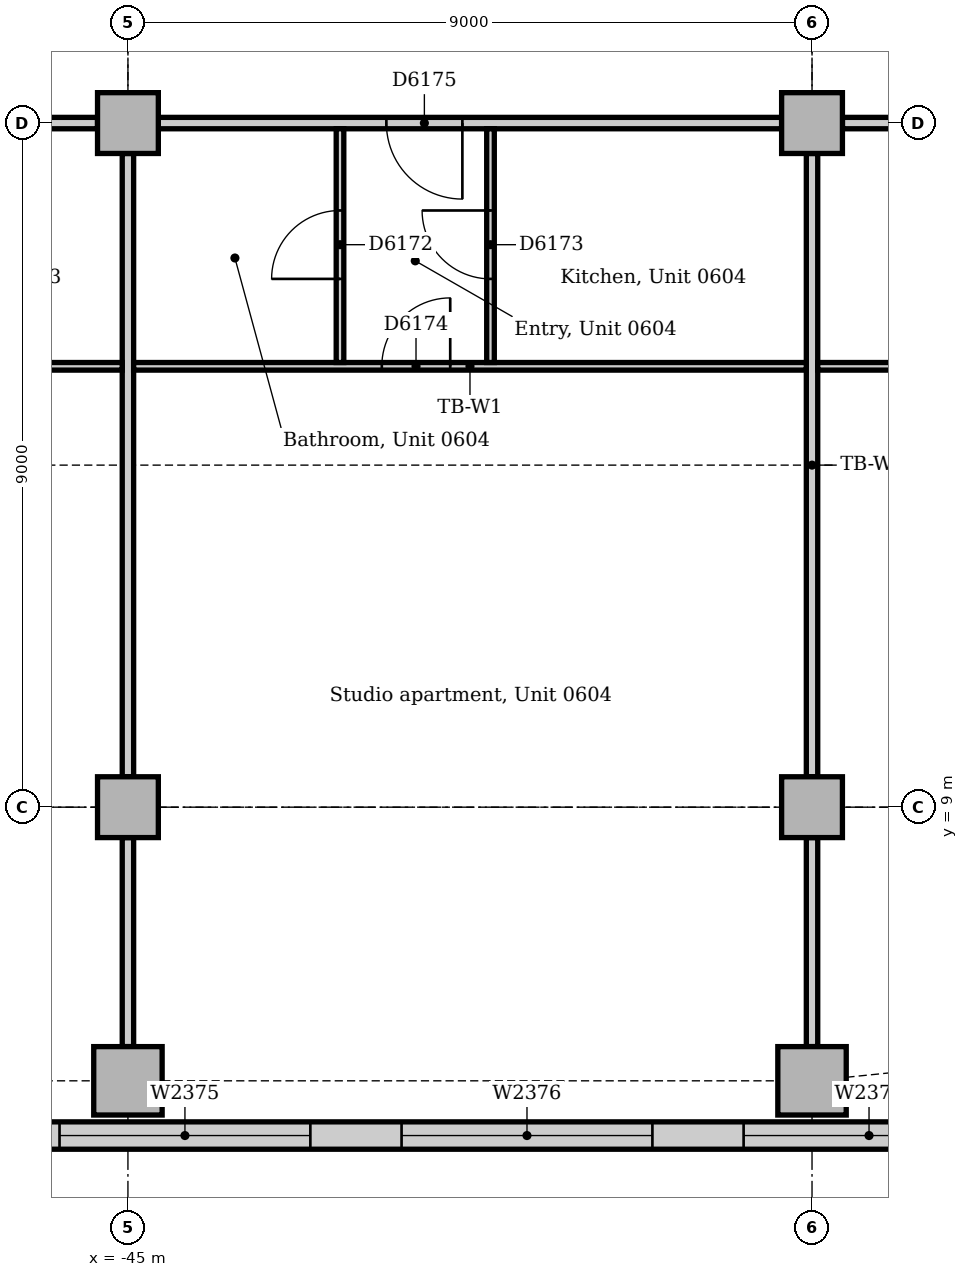
"""IFC4 building model, lengths in metres.
Left out: names, types, materials, properties, quantities, classifications, styles, units other than length and angle.
Written with IfcOpenShell. Run it as: python <this file> out.ifc"""

import sys

from ifc_helpers import new_model, si_unit, direction, frame, frame_2d, origin, origin_2d, place, context, subcontext, project, spatial, rectangle, extrude, element, fill, save


model = new_model("IFC4")
c1 = context("Model", 3, precision=1e-05, world=origin(), true_north=direction((0.0, 1.0)))
c2 = subcontext(c1, "Body", "Model", "MODEL_VIEW")
j1 = project(units=[si_unit("LENGTHUNIT", "METRE"), si_unit("PLANEANGLEUNIT", "RADIAN")], contexts=[c1])
p1 = place(None, origin())
s1 = spatial("IfcSite", under=j1, at=p1, CompositionType="ELEMENT")
p2 = place(p1, origin())
s2 = spatial("IfcBuilding", under=s1, at=p2, CompositionType="ELEMENT")
p3 = place(p2, frame((0.0, 0.0, 30.0)))
s3 = spatial("IfcBuildingStorey", under=s2, at=p3, CompositionType="ELEMENT", Elevation=30.0)
for number, where, z_axis, x_axis in (
    (1, (-45.0, 5.4, 0.0), (0.0, 0.0, 1.0), (1.0, 0.0, 0.0)),
    (2, (-36.0, 5.4, 0.0), (0.0, 0.0, 1.0), (1.0, 0.0, 0.0)),
):
    element("IfcColumn", number, at=place(p3, frame(where, z_axis=z_axis, x_axis=x_axis)), inside=s3, PredefinedType="COLUMN", context=c2, shape_type="SweptSolid", body=[
        extrude(rectangle(XDim=0.9, YDim=0.9, at=origin_2d()), origin(), (0.0, 0.0, 1.0), 3.85),
    ])
for number, where, z_axis, x_axis in (
    (3, (-45.0, 9.0, 0.0), (0.0, 0.0, 1.0), (1.0, 0.0, 0.0)),
    (4, (-45.0, 18.0, 0.0), (0.0, 0.0, 1.0), (1.0, 0.0, 0.0)),
    (5, (-36.0, 9.0, 0.0), (0.0, 0.0, 1.0), (1.0, 0.0, 0.0)),
    (6, (-36.0, 18.0, 0.0), (0.0, 0.0, 1.0), (1.0, 0.0, 0.0)),
):
    element("IfcColumn", number, at=place(p3, frame(where, z_axis=z_axis, x_axis=x_axis)), inside=s3, PredefinedType="COLUMN", context=c2, shape_type="SweptSolid", body=[
        extrude(rectangle(XDim=0.8, YDim=0.8, at=origin_2d()), origin(), (0.0, 0.0, 1.0), 3.85),
    ])
p4 = place(p3, frame((-61.757, 4.68, 0.0), z_axis=(0.0, 0.0, 1.0), x_axis=(1.0, 0.0, 0.0)))
e7 = element("IfcWall", 7, at=p4, inside=s3, PredefinedType="STANDARD", context=c2, shape_type="SweptSolid", body=[
    extrude(rectangle(XDim=30.515, YDim=0.36, at=frame_2d((15.257, 0.0))), origin(), (0.0, 0.0, 1.0), 3.85),
])
p5 = place(p4, frame((2.357, 0.0, 0.9)))
e8 = element("IfcOpeningElement", 8, at=p5, cuts=e7, PredefinedType="OPENING", context=c2, shape_type="SweptSolid", body=[
    extrude(rectangle(XDim=3.3, YDim=1.6, at=frame_2d((1.65, 0.8))), frame((0.0, 0.19, 0.0), z_axis=(0.0, -1.0, 0.0), x_axis=(1.0, 0.0, 0.0)), (0.0, 0.0, 1.0), 0.38),
])
p6 = place(p4, frame((6.857, 0.0, 0.9)))
e9 = element("IfcOpeningElement", 9, at=p6, cuts=e7, PredefinedType="OPENING", context=c2, shape_type="SweptSolid", body=[
    extrude(rectangle(XDim=3.3, YDim=1.6, at=frame_2d((1.65, 0.8))), frame((0.0, 0.19, 0.0), z_axis=(0.0, -1.0, 0.0), x_axis=(1.0, 0.0, 0.0)), (0.0, 0.0, 1.0), 0.38),
])
p7 = place(p4, frame((11.357, 0.0, 0.9)))
e10 = element("IfcOpeningElement", 10, at=p7, cuts=e7, PredefinedType="OPENING", context=c2, shape_type="SweptSolid", body=[
    extrude(rectangle(XDim=3.3, YDim=1.6, at=frame_2d((1.65, 0.8))), frame((0.0, 0.19, 0.0), z_axis=(0.0, -1.0, 0.0), x_axis=(1.0, 0.0, 0.0)), (0.0, 0.0, 1.0), 0.38),
])
p8 = place(p4, frame((15.857, 0.0, 0.9)))
e11 = element("IfcOpeningElement", 11, at=p8, cuts=e7, PredefinedType="OPENING", context=c2, shape_type="SweptSolid", body=[
    extrude(rectangle(XDim=3.3, YDim=1.6, at=frame_2d((1.65, 0.8))), frame((0.0, 0.19, 0.0), z_axis=(0.0, -1.0, 0.0), x_axis=(1.0, 0.0, 0.0)), (0.0, 0.0, 1.0), 0.38),
])
p9 = place(p4, frame((20.357, 0.0, 0.9)))
e12 = element("IfcOpeningElement", 12, at=p9, cuts=e7, PredefinedType="OPENING", context=c2, shape_type="SweptSolid", body=[
    extrude(rectangle(XDim=3.3, YDim=1.6, at=frame_2d((1.65, 0.8))), frame((0.0, 0.19, 0.0), z_axis=(0.0, -1.0, 0.0), x_axis=(1.0, 0.0, 0.0)), (0.0, 0.0, 1.0), 0.38),
])
p10 = place(p4, frame((24.857, 0.0, 0.9)))
e13 = element("IfcOpeningElement", 13, at=p10, cuts=e7, PredefinedType="OPENING", context=c2, shape_type="SweptSolid", body=[
    extrude(rectangle(XDim=3.3, YDim=1.6, at=frame_2d((1.65, 0.8))), frame((0.0, 0.19, 0.0), z_axis=(0.0, -1.0, 0.0), x_axis=(1.0, 0.0, 0.0)), (0.0, 0.0, 1.0), 0.38),
])
p11 = place(p3, frame((-35.6, 18.0, 0.0), z_axis=(0.0, 0.0, 1.0), x_axis=(1.0, 0.0, 0.0)))
e14 = element("IfcWall", 14, at=p11, inside=s3, PredefinedType="PARTITIONING", context=c2, shape_type="SweptSolid", body=[
    extrude(rectangle(XDim=7.25, YDim=0.15, at=frame_2d((3.625, 0.0))), origin(), (0.0, 0.0, 1.0), 3.15),
])
p12 = place(p11, frame((2.728, 0.0, 0.0)))
e15 = element("IfcOpeningElement", 15, at=p12, cuts=e14, PredefinedType="OPENING", context=c2, shape_type="SweptSolid", body=[
    extrude(rectangle(XDim=1.0, YDim=2.1, at=frame_2d((0.5, 1.05))), frame((0.0, 0.085, 0.0), z_axis=(0.0, -1.0, 0.0), x_axis=(1.0, 0.0, 0.0)), (0.0, 0.0, 1.0), 0.17),
])
p13 = place(p3, frame((-44.6, 18.0, 0.0), z_axis=(0.0, 0.0, 1.0), x_axis=(1.0, 0.0, 0.0)))
e16 = element("IfcWall", 16, at=p13, inside=s3, PredefinedType="PARTITIONING", context=c2, shape_type="SweptSolid", body=[
    extrude(rectangle(XDim=8.2, YDim=0.15, at=frame_2d((4.1, 0.0))), origin(), (0.0, 0.0, 1.0), 3.15),
])
p14 = place(p13, frame((3.0, 0.0, 0.0)))
e17 = element("IfcOpeningElement", 17, at=p14, cuts=e16, PredefinedType="OPENING", context=c2, shape_type="SweptSolid", body=[
    extrude(rectangle(XDim=1.0, YDim=2.1, at=frame_2d((0.5, 1.05))), frame((0.0, 0.085, 0.0), z_axis=(0.0, -1.0, 0.0), x_axis=(1.0, 0.0, 0.0)), (0.0, 0.0, 1.0), 0.17),
])
p15 = place(p3, frame((-53.6, 18.0, 0.0), z_axis=(0.0, 0.0, 1.0), x_axis=(1.0, 0.0, 0.0)))
e18 = element("IfcWall", 18, at=p15, inside=s3, PredefinedType="PARTITIONING", context=c2, shape_type="SweptSolid", body=[
    extrude(rectangle(XDim=8.2, YDim=0.15, at=frame_2d((4.1, 0.0))), origin(), (0.0, 0.0, 1.0), 3.15),
])
p16 = place(p15, frame((2.89, 0.0, 0.0)))
e19 = element("IfcOpeningElement", 19, at=p16, cuts=e18, PredefinedType="OPENING", context=c2, shape_type="SweptSolid", body=[
    extrude(rectangle(XDim=1.0, YDim=2.1, at=frame_2d((0.5, 1.05))), frame((0.0, 0.085, 0.0), z_axis=(0.0, -1.0, 0.0), x_axis=(1.0, 0.0, 0.0)), (0.0, 0.0, 1.0), 0.17),
])
p17 = place(p3, frame((-45.0, 9.4, 0.0), z_axis=(0.0, 0.0, 1.0), x_axis=(0.0, 1.0, 0.0)))
e20 = element("IfcWall", 20, at=p17, inside=s3, PredefinedType="PARTITIONING", context=c2, shape_type="SweptSolid", body=[
    extrude(rectangle(XDim=8.2, YDim=0.15, at=frame_2d((4.1, 0.0))), origin(), (0.0, 0.0, 1.0), 3.158),
])
p18 = place(p3, frame((-45.0, 5.85, 0.0), z_axis=(0.0, 0.0, 1.0), x_axis=(0.0, 1.0, 0.0)))
e21 = element("IfcWall", 21, at=p18, inside=s3, PredefinedType="PARTITIONING", context=c2, shape_type="SweptSolid", body=[
    extrude(rectangle(XDim=2.75, YDim=0.15, at=frame_2d((1.375, 0.0))), origin(), (0.0, 0.0, 1.0), 3.652),
])
p19 = place(p3, frame((-36.0, 9.4, 0.0), z_axis=(0.0, 0.0, 1.0), x_axis=(0.0, 1.0, 0.0)))
e22 = element("IfcWall", 22, at=p19, inside=s3, PredefinedType="PARTITIONING", context=c2, shape_type="SweptSolid", body=[
    extrude(rectangle(XDim=8.2, YDim=0.15, at=frame_2d((4.1, 0.0))), origin(), (0.0, 0.0, 1.0), 3.158),
])
p20 = place(p3, frame((-36.0, 5.85, 0.0), z_axis=(0.0, 0.0, 1.0), x_axis=(0.0, 1.0, 0.0)))
e23 = element("IfcWall", 23, at=p20, inside=s3, PredefinedType="PARTITIONING", context=c2, shape_type="SweptSolid", body=[
    extrude(rectangle(XDim=2.75, YDim=0.15, at=frame_2d((1.375, 0.0))), origin(), (0.0, 0.0, 1.0), 3.652),
])
p21 = place(p3, frame((-53.925, 14.8, 0.0), z_axis=(0.0, 0.0, 1.0), x_axis=(1.0, 0.0, 0.0)))
e24 = element("IfcWall", 24, at=p21, inside=s3, PredefinedType="PARTITIONING", context=c2, shape_type="SweptSolid", body=[
    extrude(rectangle(XDim=8.85, YDim=0.1, at=frame_2d((4.425, 0.0))), origin(), (0.0, 0.0, 1.0), 3.85),
])
p22 = place(p21, frame((3.265, 0.0, 0.0)))
e25 = element("IfcOpeningElement", 25, at=p22, cuts=e24, PredefinedType="OPENING", context=c2, shape_type="SweptSolid", body=[
    extrude(rectangle(XDim=0.9, YDim=2.1, at=frame_2d((0.45, 1.05))), frame((0.0, 0.06, 0.0), z_axis=(0.0, -1.0, 0.0), x_axis=(1.0, 0.0, 0.0)), (0.0, 0.0, 1.0), 0.12),
])
p23 = place(p3, frame((-44.925, 14.8, 0.0), z_axis=(0.0, 0.0, 1.0), x_axis=(1.0, 0.0, 0.0)))
e26 = element("IfcWall", 26, at=p23, inside=s3, PredefinedType="PARTITIONING", context=c2, shape_type="SweptSolid", body=[
    extrude(rectangle(XDim=8.85, YDim=0.1, at=frame_2d((4.425, 0.0))), origin(), (0.0, 0.0, 1.0), 3.85),
])
p24 = place(p23, frame((3.265, 0.0, 0.0)))
e27 = element("IfcOpeningElement", 27, at=p24, cuts=e26, PredefinedType="OPENING", context=c2, shape_type="SweptSolid", body=[
    extrude(rectangle(XDim=0.9, YDim=2.1, at=frame_2d((0.45, 1.05))), frame((0.0, 0.06, 0.0), z_axis=(0.0, -1.0, 0.0), x_axis=(1.0, 0.0, 0.0)), (0.0, 0.0, 1.0), 0.12),
])
p25 = place(p3, frame((-35.925, 14.8, 0.0), z_axis=(0.0, 0.0, 1.0), x_axis=(1.0, 0.0, 0.0)))
e28 = element("IfcWall", 28, at=p25, inside=s3, PredefinedType="PARTITIONING", context=c2, shape_type="SweptSolid", body=[
    extrude(rectangle(XDim=8.565, YDim=0.1, at=frame_2d((4.282, 0.0))), origin(), (0.0, 0.0, 1.0), 3.85),
])
p26 = place(p25, frame((3.103, 0.0, 0.0)))
e29 = element("IfcOpeningElement", 29, at=p26, cuts=e28, PredefinedType="OPENING", context=c2, shape_type="SweptSolid", body=[
    extrude(rectangle(XDim=0.9, YDim=2.1, at=frame_2d((0.45, 1.05))), frame((0.0, 0.06, 0.0), z_axis=(0.0, -1.0, 0.0), x_axis=(1.0, 0.0, 0.0)), (0.0, 0.0, 1.0), 0.12),
])
p27 = place(p3, frame((-42.21, 14.85, 0.0), z_axis=(0.0, 0.0, 1.0), x_axis=(0.0, 1.0, 0.0)))
e30 = element("IfcWall", 30, at=p27, inside=s3, PredefinedType="PARTITIONING", context=c2, shape_type="SweptSolid", body=[
    extrude(rectangle(XDim=3.075, YDim=0.1, at=frame_2d((1.538, 0.0))), origin(), (0.0, 0.0, 1.0), 3.85),
])
p28 = place(p27, frame((1.1, 0.0, 0.0)))
e31 = element("IfcOpeningElement", 31, at=p28, cuts=e30, PredefinedType="OPENING", context=c2, shape_type="SweptSolid", body=[
    extrude(rectangle(XDim=0.9, YDim=2.1, at=frame_2d((0.45, 1.05))), frame((0.0, 0.06, 0.0), z_axis=(0.0, -1.0, 0.0), x_axis=(1.0, 0.0, 0.0)), (0.0, 0.0, 1.0), 0.12),
])
p29 = place(p3, frame((-40.23, 14.85, 0.0), z_axis=(0.0, 0.0, 1.0), x_axis=(0.0, 1.0, 0.0)))
e32 = element("IfcWall", 32, at=p29, inside=s3, PredefinedType="PARTITIONING", context=c2, shape_type="SweptSolid", body=[
    extrude(rectangle(XDim=3.075, YDim=0.1, at=frame_2d((1.538, 0.0))), origin(), (0.0, 0.0, 1.0), 3.85),
])
p30 = place(p29, frame((1.1, 0.0, 0.0)))
e33 = element("IfcOpeningElement", 33, at=p30, cuts=e32, PredefinedType="OPENING", context=c2, shape_type="SweptSolid", body=[
    extrude(rectangle(XDim=0.9, YDim=2.1, at=frame_2d((0.45, 1.05))), frame((0.0, 0.06, 0.0), z_axis=(0.0, -1.0, 0.0), x_axis=(1.0, 0.0, 0.0)), (0.0, 0.0, 1.0), 0.12),
])
p31 = place(p8, origin())
e34 = element("IfcWindow", 34, at=p31, inside=s3, PartitioningType="SINGLE_PANEL", PredefinedType="WINDOW", context=c2, shape_type="SweptSolid", body=[
    extrude(rectangle(XDim=3.3, YDim=1.6, at=frame_2d((1.65, 0.8))), frame((0.0, 0.13, 0.0), z_axis=(0.0, -1.0, 0.0), x_axis=(1.0, 0.0, 0.0)), (0.0, 0.0, 1.0), 0.06),
])
fill(e11, e34)
p32 = place(p9, origin())
e35 = element("IfcWindow", 35, at=p32, inside=s3, PartitioningType="SINGLE_PANEL", PredefinedType="WINDOW", context=c2, shape_type="SweptSolid", body=[
    extrude(rectangle(XDim=3.3, YDim=1.6, at=frame_2d((1.65, 0.8))), frame((0.0, 0.13, 0.0), z_axis=(0.0, -1.0, 0.0), x_axis=(1.0, 0.0, 0.0)), (0.0, 0.0, 1.0), 0.06),
])
fill(e12, e35)
p33 = place(p10, origin())
e36 = element("IfcWindow", 36, at=p33, inside=s3, PartitioningType="SINGLE_PANEL", PredefinedType="WINDOW", context=c2, shape_type="SweptSolid", body=[
    extrude(rectangle(XDim=3.3, YDim=1.6, at=frame_2d((1.65, 0.8))), frame((0.0, 0.13, 0.0), z_axis=(0.0, -1.0, 0.0), x_axis=(1.0, 0.0, 0.0)), (0.0, 0.0, 1.0), 0.06),
])
fill(e13, e36)
p34 = place(p28, origin())
e37 = element("IfcDoor", 37, at=p34, inside=s3, OperationType="SINGLE_SWING_LEFT", PredefinedType="DOOR", context=c2, shape_type="SweptSolid", body=[
    extrude(rectangle(XDim=0.9, YDim=2.1, at=frame_2d((0.45, 1.05))), frame((0.0, 0.025, 0.0), z_axis=(0.0, -1.0, 0.0), x_axis=(1.0, 0.0, 0.0)), (0.0, 0.0, 1.0), 0.05),
])
fill(e31, e37)
p35 = place(p30, origin())
e38 = element("IfcDoor", 38, at=p35, inside=s3, OperationType="SINGLE_SWING_RIGHT", PredefinedType="DOOR", context=c2, shape_type="SweptSolid", body=[
    extrude(rectangle(XDim=0.9, YDim=2.1, at=frame_2d((0.45, 1.05))), frame((0.0, 0.025, 0.0), z_axis=(0.0, -1.0, 0.0), x_axis=(1.0, 0.0, 0.0)), (0.0, 0.0, 1.0), 0.05),
])
fill(e33, e38)
p36 = place(p24, origin())
e39 = element("IfcDoor", 39, at=p36, inside=s3, OperationType="SINGLE_SWING_RIGHT", PredefinedType="DOOR", context=c2, shape_type="SweptSolid", body=[
    extrude(rectangle(XDim=0.9, YDim=2.1, at=frame_2d((0.45, 1.05))), frame((0.0, 0.025, 0.0), z_axis=(0.0, -1.0, 0.0), x_axis=(1.0, 0.0, 0.0)), (0.0, 0.0, 1.0), 0.05),
])
fill(e27, e39)
p37 = place(p14, frame((1.0, 0.0, 0.0), z_axis=(0.0, 0.0, 1.0), x_axis=(-1.0, 0.0, 0.0)))
e40 = element("IfcDoor", 40, at=p37, inside=s3, OperationType="SINGLE_SWING_LEFT", PredefinedType="DOOR", context=c2, shape_type="SweptSolid", body=[
    extrude(rectangle(XDim=1.0, YDim=2.1, at=frame_2d((0.5, 1.05))), frame((0.0, 0.025, 0.0), z_axis=(0.0, -1.0, 0.0), x_axis=(1.0, 0.0, 0.0)), (0.0, 0.0, 1.0), 0.05),
])
fill(e17, e40)
save(model, sys.argv[1])
